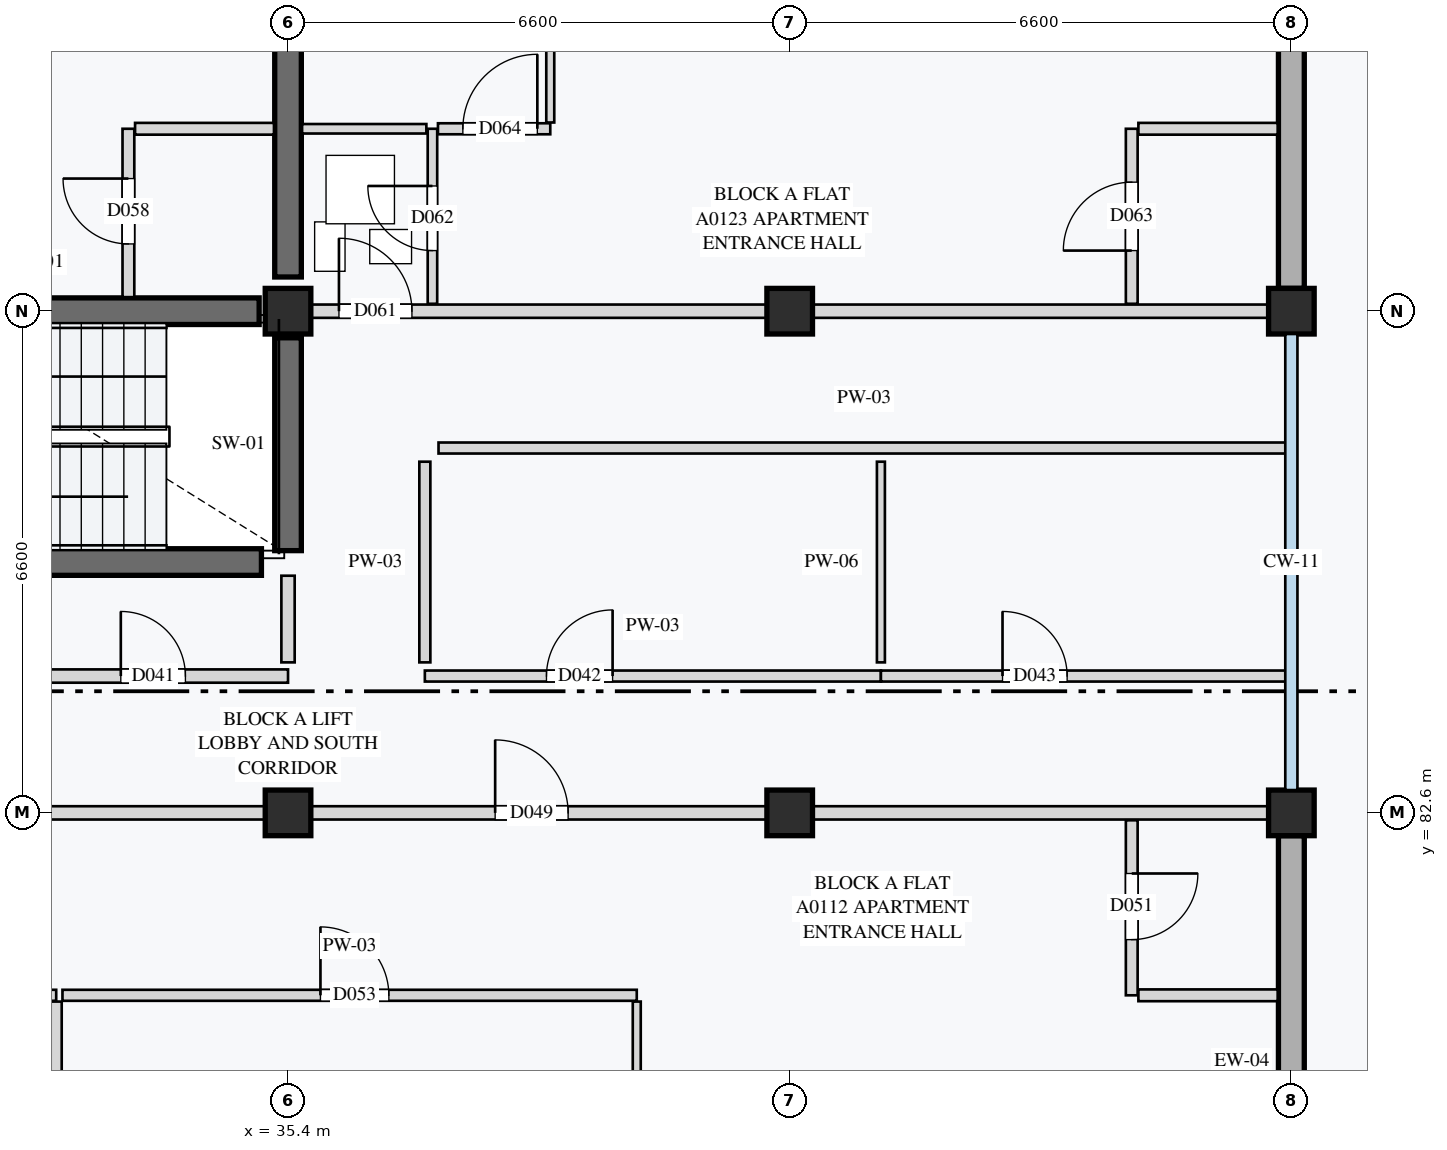
"""IFC4 building model, lengths in metres.
Left out: names, types, materials, properties, quantities, classifications, styles, units other than length and angle.
Written with IfcOpenShell. Run it as: python <this file> out.ifc"""

import sys

from ifc_helpers import new_model, si_unit, direction, frame, frame_2d, origin, origin_2d, place, context, subcontext, project, spatial, rectangle, extrude, element, fill, save


model = new_model("IFC4")
c1 = context("Model", 3, precision=1e-05, world=origin(), true_north=direction((0.0, 1.0)))
c2 = subcontext(c1, "Body", "Model", "MODEL_VIEW")
j1 = project(units=[si_unit("LENGTHUNIT", "METRE"), si_unit("PLANEANGLEUNIT", "RADIAN")], contexts=[c1])
p1 = place(None, origin())
s1 = spatial("IfcSite", under=j1, at=p1, CompositionType="ELEMENT")
p2 = place(p1, origin())
s2 = spatial("IfcBuilding", under=s1, at=p2, CompositionType="ELEMENT")
p3 = place(p2, frame((0.0, 0.0, 4.2)))
s3 = spatial("IfcBuildingStorey", under=s2, at=p3, CompositionType="ELEMENT", Elevation=4.2)
for number, where, z_axis, x_axis in (
    (1, (35.4, 82.6, 0.0), (0.0, 0.0, 1.0), (1.0, 0.0, 0.0)),
    (2, (35.4, 89.2, 0.0), (0.0, 0.0, 1.0), (1.0, 0.0, 0.0)),
    (3, (42.0, 82.6, 0.0), (0.0, 0.0, 1.0), (1.0, 0.0, 0.0)),
    (4, (42.0, 89.2, 0.0), (0.0, 0.0, 1.0), (1.0, 0.0, 0.0)),
    (5, (48.6, 82.6, 0.0), (0.0, 0.0, 1.0), (1.0, 0.0, 0.0)),
    (6, (48.6, 89.2, 0.0), (0.0, 0.0, 1.0), (1.0, 0.0, 0.0)),
):
    element("IfcColumn", number, at=place(p3, frame(where, z_axis=z_axis, x_axis=x_axis)), inside=s3, PredefinedType="COLUMN", context=c2, shape_type="SweptSolid", body=[
        extrude(rectangle(XDim=0.6, YDim=0.6, at=origin_2d()), origin(), (0.0, 0.0, 1.0), 4.2),
    ])
p4 = place(p3, frame((29.18, 89.2, 0.0), z_axis=(0.0, 0.0, 1.0), x_axis=(1.0, 0.0, 0.0)))
e7 = element("IfcWall", 7, at=p4, inside=s3, PredefinedType="SHEAR", context=c2, shape_type="SweptSolid", body=[
    extrude(rectangle(XDim=5.84, YDim=0.35, at=frame_2d((2.92, 0.0))), origin(), (0.0, 0.0, 1.0), 3.96),
])
for number, where, z_axis, x_axis in (
    (8, (32.25, 85.9, 0.0), (0.0, 0.0, 1.0), (1.0, 0.0, 0.0)),
    (9, (35.4, 86.05, 0.0), (0.0, 0.0, 1.0), (0.0, 1.0, 0.0)),
):
    element("IfcWall", number, at=place(p3, frame(where, z_axis=z_axis, x_axis=x_axis)), inside=s3, PredefinedType="SHEAR", context=c2, shape_type="SweptSolid", body=[
        extrude(rectangle(XDim=2.8, YDim=0.35, at=frame_2d((1.4, 0.0))), origin(), (0.0, 0.0, 1.0), 3.96),
    ])
p5 = place(p3, frame((35.4, 89.65, 0.0), z_axis=(0.0, 0.0, 1.0), x_axis=(0.0, 1.0, 0.0)))
e10 = element("IfcWall", 10, at=p5, inside=s3, PredefinedType="SHEAR", context=c2, shape_type="SweptSolid", body=[
    extrude(rectangle(XDim=5.7, YDim=0.35, at=frame_2d((2.85, 0.0))), origin(), (0.0, 0.0, 1.0), 3.96),
])
for number, where, z_axis, x_axis in (
    (11, (48.6, 76.375, 0.0), (0.0, 0.0, 1.0), (0.0, 1.0, 0.0)),
    (12, (48.6, 89.5, 0.0), (0.0, 0.0, 1.0), (0.0, 1.0, 0.0)),
):
    element("IfcWall", number, at=place(p3, frame(where, z_axis=z_axis, x_axis=x_axis)), inside=s3, PredefinedType="STANDARD", context=c2, shape_type="SweptSolid", body=[
        extrude(rectangle(XDim=5.925, YDim=0.34, at=frame_2d((2.962, 0.0))), origin(), (0.0, 0.0, 1.0), 3.65),
    ])
p6 = place(p3, frame((32.1, 84.4, 0.0), z_axis=(0.0, 0.0, 1.0), x_axis=(1.0, 0.0, 0.0)))
e13 = element("IfcWall", 13, at=p6, inside=s3, PredefinedType="PARTITIONING", context=c2, shape_type="SweptSolid", body=[
    extrude(rectangle(XDim=3.3, YDim=0.175, at=frame_2d((1.65, 0.0))), origin(), (0.0, 0.0, 1.0), 3.96),
])
p7 = place(p6, frame((1.1, 0.0, 0.0)))
e14 = element("IfcOpeningElement", 14, at=p7, cuts=e13, PredefinedType="OPENING", context=c2, shape_type="SweptSolid", body=[
    extrude(rectangle(XDim=0.85, YDim=2.0, at=frame_2d((0.425, 1.0))), frame((0.0, 0.097, 0.0), z_axis=(0.0, -1.0, 0.0), x_axis=(1.0, 0.0, 0.0)), (0.0, 0.0, 1.0), 0.195),
])
p8 = place(p3, frame((35.4, 84.58, 0.0), z_axis=(0.0, 0.0, 1.0), x_axis=(0.0, 1.0, 0.0)))
e15 = element("IfcWall", 15, at=p8, inside=s3, PredefinedType="PARTITIONING", context=c2, shape_type="SweptSolid", body=[
    extrude(rectangle(XDim=1.14, YDim=0.175, at=frame_2d((0.57, 0.0))), origin(), (0.0, 0.0, 1.0), 3.96),
])
p9 = place(p3, frame((37.2, 84.4, 0.0), z_axis=(0.0, 0.0, 1.0), x_axis=(1.0, 0.0, 0.0)))
e16 = element("IfcWall", 16, at=p9, inside=s3, PredefinedType="PARTITIONING", context=c2, shape_type="SweptSolid", body=[
    extrude(rectangle(XDim=6.0, YDim=0.145, at=frame_2d((3.0, 0.0))), origin(), (0.0, 0.0, 1.0), 3.96),
])
p10 = place(p9, frame((1.6, 0.0, 0.0)))
e17 = element("IfcOpeningElement", 17, at=p10, cuts=e16, PredefinedType="OPENING", context=c2, shape_type="SweptSolid", body=[
    extrude(rectangle(XDim=0.87, YDim=2.08, at=frame_2d((0.435, 1.04))), frame((0.0, 0.083, 0.0), z_axis=(0.0, -1.0, 0.0), x_axis=(1.0, 0.0, 0.0)), (0.0, 0.0, 1.0), 0.165),
])
p11 = place(p3, frame((43.2, 84.4, 0.0), z_axis=(0.0, 0.0, 1.0), x_axis=(1.0, 0.0, 0.0)))
e18 = element("IfcWall", 18, at=p11, inside=s3, PredefinedType="PARTITIONING", context=c2, shape_type="SweptSolid", body=[
    extrude(rectangle(XDim=5.4, YDim=0.145, at=frame_2d((2.7, 0.0))), origin(), (0.0, 0.0, 1.0), 3.96),
])
p12 = place(p11, frame((1.6, 0.0, 0.0)))
e19 = element("IfcOpeningElement", 19, at=p12, cuts=e18, PredefinedType="OPENING", context=c2, shape_type="SweptSolid", body=[
    extrude(rectangle(XDim=0.85, YDim=2.1, at=frame_2d((0.425, 1.05))), frame((0.0, 0.083, 0.0), z_axis=(0.0, -1.0, 0.0), x_axis=(1.0, 0.0, 0.0)), (0.0, 0.0, 1.0), 0.165),
])
p13 = place(p3, frame((43.2, 84.58, 0.0), z_axis=(0.0, 0.0, 1.0), x_axis=(0.0, 1.0, 0.0)))
e20 = element("IfcWall", 20, at=p13, inside=s3, PredefinedType="PARTITIONING", context=c2, shape_type="SweptSolid", body=[
    extrude(rectangle(XDim=2.64, YDim=0.105, at=frame_2d((1.32, 0.0))), origin(), (0.0, 0.0, 1.0), 3.96),
])
p14 = place(p3, frame((37.38, 87.4, 0.0), z_axis=(0.0, 0.0, 1.0), x_axis=(1.0, 0.0, 0.0)))
e21 = element("IfcWall", 21, at=p14, inside=s3, PredefinedType="PARTITIONING", context=c2, shape_type="SweptSolid", body=[
    extrude(rectangle(XDim=11.2, YDim=0.145, at=frame_2d((5.6, 0.0))), origin(), (0.0, 0.0, 1.0), 3.96),
])
p15 = place(p3, frame((37.2, 84.58, 0.0), z_axis=(0.0, 0.0, 1.0), x_axis=(0.0, 1.0, 0.0)))
e22 = element("IfcWall", 22, at=p15, inside=s3, PredefinedType="PARTITIONING", context=c2, shape_type="SweptSolid", body=[
    extrude(rectangle(XDim=2.64, YDim=0.145, at=frame_2d((1.32, 0.0))), origin(), (0.0, 0.0, 1.0), 3.96),
])
p16 = place(p3, frame((28.8, 82.6, 0.0), z_axis=(0.0, 0.0, 1.0), x_axis=(1.0, 0.0, 0.0)))
e23 = element("IfcWall", 23, at=p16, inside=s3, PredefinedType="PARTITIONING", context=c2, shape_type="SweptSolid", body=[
    extrude(rectangle(XDim=19.8, YDim=0.175, at=frame_2d((9.9, 0.0))), origin(), (0.0, 0.0, 1.0), 3.7),
])
p17 = place(p16, frame((9.325, 0.0, 0.0)))
e24 = element("IfcOpeningElement", 24, at=p17, cuts=e23, PredefinedType="OPENING", context=c2, shape_type="SweptSolid", body=[
    extrude(rectangle(XDim=0.96, YDim=2.18, at=frame_2d((0.48, 1.09))), frame((0.0, 0.097, 0.0), z_axis=(0.0, -1.0, 0.0), x_axis=(1.0, 0.0, 0.0)), (0.0, 0.0, 1.0), 0.195),
])
p18 = place(p3, frame((46.5, 82.502, 0.0), z_axis=(0.0, 0.0, 1.0), x_axis=(0.0, -1.0, 0.0)))
e25 = element("IfcWall", 25, at=p18, inside=s3, PredefinedType="PARTITIONING", context=c2, shape_type="SweptSolid", body=[
    extrude(rectangle(XDim=2.302, YDim=0.155, at=frame_2d((1.151, 0.0))), origin(), (0.0, 0.0, 1.0), 3.96),
])
p19 = place(p18, frame((0.7, 0.0, 0.0)))
e26 = element("IfcOpeningElement", 26, at=p19, cuts=e25, PredefinedType="OPENING", context=c2, shape_type="SweptSolid", body=[
    extrude(rectangle(XDim=0.87, YDim=2.08, at=frame_2d((0.435, 1.04))), frame((0.0, 0.087, 0.0), z_axis=(0.0, -1.0, 0.0), x_axis=(1.0, 0.0, 0.0)), (0.0, 0.0, 1.0), 0.175),
])
p20 = place(p3, frame((46.587, 80.2, 0.0), z_axis=(0.0, 0.0, 1.0), x_axis=(1.0, 0.0, 0.0)))
e27 = element("IfcWall", 27, at=p20, inside=s3, PredefinedType="PARTITIONING", context=c2, shape_type="SweptSolid", body=[
    extrude(rectangle(XDim=1.833, YDim=0.155, at=frame_2d((0.916, 0.0))), origin(), (0.0, 0.0, 1.0), 3.96),
])
p21 = place(p3, frame((30.772, 80.2, 0.0), z_axis=(0.0, 0.0, 1.0), x_axis=(1.0, 0.0, 0.0)))
e28 = element("IfcWall", 28, at=p21, inside=s3, PredefinedType="PARTITIONING", context=c2, shape_type="SweptSolid", body=[
    extrude(rectangle(XDim=1.578, YDim=0.145, at=frame_2d((0.789, 0.0))), origin(), (0.0, 0.0, 1.0), 3.96),
])
p22 = place(p21, frame((0.4, 0.0, 0.0)))
e29 = element("IfcOpeningElement", 29, at=p22, cuts=e28, PredefinedType="OPENING", context=c2, shape_type="SweptSolid", body=[
    extrude(rectangle(XDim=0.85, YDim=2.1, at=frame_2d((0.425, 1.05))), frame((0.0, 0.083, 0.0), z_axis=(0.0, -1.0, 0.0), x_axis=(1.0, 0.0, 0.0)), (0.0, 0.0, 1.0), 0.165),
])
p23 = place(p3, frame((32.35, 80.117, 0.0), z_axis=(0.0, 0.0, 1.0), x_axis=(0.0, -1.0, 0.0)))
e30 = element("IfcWall", 30, at=p23, inside=s3, PredefinedType="PARTITIONING", context=c2, shape_type="SweptSolid", body=[
    extrude(rectangle(XDim=3.938, YDim=0.145, at=frame_2d((1.969, 0.0))), origin(), (0.0, 0.0, 1.0), 3.96),
])
p24 = place(p3, frame((32.433, 80.2, 0.0), z_axis=(0.0, 0.0, 1.0), x_axis=(1.0, 0.0, 0.0)))
e31 = element("IfcWall", 31, at=p24, inside=s3, PredefinedType="PARTITIONING", context=c2, shape_type="SweptSolid", body=[
    extrude(rectangle(XDim=7.555, YDim=0.145, at=frame_2d((3.778, 0.0))), origin(), (0.0, 0.0, 1.0), 3.96),
])
p25 = place(p24, frame((3.394, 0.0, 0.0)))
e32 = element("IfcOpeningElement", 32, at=p25, cuts=e31, PredefinedType="OPENING", context=c2, shape_type="SweptSolid", body=[
    extrude(rectangle(XDim=0.9, YDim=2.1, at=frame_2d((0.45, 1.05))), frame((0.0, 0.083, 0.0), z_axis=(0.0, -1.0, 0.0), x_axis=(1.0, 0.0, 0.0)), (0.0, 0.0, 1.0), 0.165),
])
p26 = place(p3, frame((39.988, 80.117, 0.0), z_axis=(0.0, 0.0, 1.0), x_axis=(0.0, -1.0, 0.0)))
e33 = element("IfcWall", 33, at=p26, inside=s3, PredefinedType="PARTITIONING", context=c2, shape_type="SweptSolid", body=[
    extrude(rectangle(XDim=3.938, YDim=0.105, at=frame_2d((1.969, 0.0))), origin(), (0.0, 0.0, 1.0), 3.96),
])
p27 = place(p3, frame((33.3, 89.385, 0.0), z_axis=(0.0, 0.0, 1.0), x_axis=(0.0, 1.0, 0.0)))
e34 = element("IfcWall", 34, at=p27, inside=s3, PredefinedType="PARTITIONING", context=c2, shape_type="SweptSolid", body=[
    extrude(rectangle(XDim=2.215, YDim=0.155, at=frame_2d((1.107, 0.0))), origin(), (0.0, 0.0, 1.0), 3.96),
])
p28 = place(p27, frame((0.7, 0.0, 0.0)))
e35 = element("IfcOpeningElement", 35, at=p28, cuts=e34, PredefinedType="OPENING", context=c2, shape_type="SweptSolid", body=[
    extrude(rectangle(XDim=0.86, YDim=2.12, at=frame_2d((0.43, 1.06))), frame((0.0, 0.087, 0.0), z_axis=(0.0, -1.0, 0.0), x_axis=(1.0, 0.0, 0.0)), (0.0, 0.0, 1.0), 0.175),
])
p29 = place(p3, frame((33.387, 91.6, 0.0), z_axis=(0.0, 0.0, 1.0), x_axis=(1.0, 0.0, 0.0)))
e36 = element("IfcWall", 36, at=p29, inside=s3, PredefinedType="PARTITIONING", context=c2, shape_type="SweptSolid", body=[
    extrude(rectangle(XDim=1.828, YDim=0.155, at=frame_2d((0.914, 0.0))), origin(), (0.0, 0.0, 1.0), 3.96),
])
p30 = place(p3, frame((35.4, 89.2, 0.0), z_axis=(0.0, 0.0, 1.0), x_axis=(1.0, 0.0, 0.0)))
e37 = element("IfcWall", 37, at=p30, inside=s3, PredefinedType="PARTITIONING", context=c2, shape_type="SweptSolid", body=[
    extrude(rectangle(XDim=13.2, YDim=0.175, at=frame_2d((6.6, 0.0))), origin(), (0.0, 0.0, 1.0), 3.7),
])
p31 = place(p30, frame((0.67, 0.0, 0.0)))
e38 = element("IfcOpeningElement", 38, at=p31, cuts=e37, PredefinedType="OPENING", context=c2, shape_type="SweptSolid", body=[
    extrude(rectangle(XDim=0.96, YDim=2.18, at=frame_2d((0.48, 1.09))), frame((0.0, 0.097, 0.0), z_axis=(0.0, -1.0, 0.0), x_axis=(1.0, 0.0, 0.0)), (0.0, 0.0, 1.0), 0.195),
])
p32 = place(p3, frame((37.3, 89.298, 0.0), z_axis=(0.0, 0.0, 1.0), x_axis=(0.0, 1.0, 0.0)))
e39 = element("IfcWall", 39, at=p32, inside=s3, PredefinedType="PARTITIONING", context=c2, shape_type="SweptSolid", body=[
    extrude(rectangle(XDim=2.302, YDim=0.125, at=frame_2d((1.151, 0.0))), origin(), (0.0, 0.0, 1.0), 3.96),
])
p33 = place(p32, frame((0.7, 0.0, 0.0)))
e40 = element("IfcOpeningElement", 40, at=p33, cuts=e39, PredefinedType="OPENING", context=c2, shape_type="SweptSolid", body=[
    extrude(rectangle(XDim=0.85, YDim=2.04, at=frame_2d((0.425, 1.02))), frame((0.0, 0.073, 0.0), z_axis=(0.0, -1.0, 0.0), x_axis=(1.0, 0.0, 0.0)), (0.0, 0.0, 1.0), 0.145),
])
p34 = place(p3, frame((35.585, 91.6, 0.0), z_axis=(0.0, 0.0, 1.0), x_axis=(1.0, 0.0, 0.0)))
e41 = element("IfcWall", 41, at=p34, inside=s3, PredefinedType="PARTITIONING", context=c2, shape_type="SweptSolid", body=[
    extrude(rectangle(XDim=1.635, YDim=0.125, at=frame_2d((0.817, 0.0))), origin(), (0.0, 0.0, 1.0), 3.96),
])
p35 = place(p3, frame((46.5, 89.298, 0.0), z_axis=(0.0, 0.0, 1.0), x_axis=(0.0, 1.0, 0.0)))
e42 = element("IfcWall", 42, at=p35, inside=s3, PredefinedType="PARTITIONING", context=c2, shape_type="SweptSolid", body=[
    extrude(rectangle(XDim=2.302, YDim=0.155, at=frame_2d((1.151, 0.0))), origin(), (0.0, 0.0, 1.0), 3.96),
])
p36 = place(p35, frame((0.7, 0.0, 0.0)))
e43 = element("IfcOpeningElement", 43, at=p36, cuts=e42, PredefinedType="OPENING", context=c2, shape_type="SweptSolid", body=[
    extrude(rectangle(XDim=0.9, YDim=2.16, at=frame_2d((0.45, 1.08))), frame((0.0, 0.087, 0.0), z_axis=(0.0, -1.0, 0.0), x_axis=(1.0, 0.0, 0.0)), (0.0, 0.0, 1.0), 0.175),
])
p37 = place(p3, frame((46.587, 91.6, 0.0), z_axis=(0.0, 0.0, 1.0), x_axis=(1.0, 0.0, 0.0)))
e44 = element("IfcWall", 44, at=p37, inside=s3, PredefinedType="PARTITIONING", context=c2, shape_type="SweptSolid", body=[
    extrude(rectangle(XDim=1.833, YDim=0.155, at=frame_2d((0.916, 0.0))), origin(), (0.0, 0.0, 1.0), 3.96),
])
p38 = place(p3, frame((37.373, 91.6, 0.0), z_axis=(0.0, 0.0, 1.0), x_axis=(1.0, 0.0, 0.0)))
e45 = element("IfcWall", 45, at=p38, inside=s3, PredefinedType="PARTITIONING", context=c2, shape_type="SweptSolid", body=[
    extrude(rectangle(XDim=1.478, YDim=0.145, at=frame_2d((0.739, 0.0))), origin(), (0.0, 0.0, 1.0), 3.96),
])
p39 = place(p38, frame((0.327, 0.0, 0.0)))
e46 = element("IfcOpeningElement", 46, at=p39, cuts=e45, PredefinedType="OPENING", context=c2, shape_type="SweptSolid", body=[
    extrude(rectangle(XDim=0.98, YDim=2.12, at=frame_2d((0.49, 1.06))), frame((0.0, 0.083, 0.0), z_axis=(0.0, -1.0, 0.0), x_axis=(1.0, 0.0, 0.0)), (0.0, 0.0, 1.0), 0.165),
])
p40 = place(p3, frame((38.85, 91.683, 0.0), z_axis=(0.0, 0.0, 1.0), x_axis=(0.0, 1.0, 0.0)))
e47 = element("IfcWall", 47, at=p40, inside=s3, PredefinedType="PARTITIONING", context=c2, shape_type="SweptSolid", body=[
    extrude(rectangle(XDim=3.938, YDim=0.105, at=frame_2d((1.969, 0.0))), origin(), (0.0, 0.0, 1.0), 3.96),
])
p41 = place(p7, origin())
e48 = element("IfcDoor", 48, at=p41, inside=s3, OperationType="SINGLE_SWING_LEFT", PredefinedType="DOOR", context=c2, shape_type="SweptSolid", body=[
    extrude(rectangle(XDim=0.85, YDim=2.0, at=frame_2d((0.425, 1.0))), frame((0.0, 0.025, 0.0), z_axis=(0.0, -1.0, 0.0), x_axis=(1.0, 0.0, 0.0)), (0.0, 0.0, 1.0), 0.05),
])
fill(e14, e48)
p42 = place(p10, origin())
e49 = element("IfcDoor", 49, at=p42, inside=s3, OperationType="SINGLE_SWING_RIGHT", PredefinedType="DOOR", context=c2, shape_type="SweptSolid", body=[
    extrude(rectangle(XDim=0.87, YDim=2.08, at=frame_2d((0.435, 1.04))), frame((0.0, 0.025, 0.0), z_axis=(0.0, -1.0, 0.0), x_axis=(1.0, 0.0, 0.0)), (0.0, 0.0, 1.0), 0.05),
])
fill(e17, e49)
p43 = place(p12, origin())
e50 = element("IfcDoor", 50, at=p43, inside=s3, OperationType="SINGLE_SWING_LEFT", PredefinedType="DOOR", context=c2, shape_type="SweptSolid", body=[
    extrude(rectangle(XDim=0.85, YDim=2.1, at=frame_2d((0.425, 1.05))), frame((0.0, 0.025, 0.0), z_axis=(0.0, -1.0, 0.0), x_axis=(1.0, 0.0, 0.0)), (0.0, 0.0, 1.0), 0.05),
])
fill(e19, e50)
p44 = place(p17, origin())
e51 = element("IfcDoor", 51, at=p44, inside=s3, OperationType="SINGLE_SWING_LEFT", PredefinedType="DOOR", context=c2, shape_type="SweptSolid", body=[
    extrude(rectangle(XDim=0.96, YDim=2.18, at=frame_2d((0.48, 1.09))), frame((0.0, 0.025, 0.0), z_axis=(0.0, -1.0, 0.0), x_axis=(1.0, 0.0, 0.0)), (0.0, 0.0, 1.0), 0.05),
])
fill(e24, e51)
p45 = place(p19, origin())
e52 = element("IfcDoor", 52, at=p45, inside=s3, OperationType="SINGLE_SWING_LEFT", PredefinedType="DOOR", context=c2, shape_type="SweptSolid", body=[
    extrude(rectangle(XDim=0.87, YDim=2.08, at=frame_2d((0.435, 1.04))), frame((0.0, 0.025, 0.0), z_axis=(0.0, -1.0, 0.0), x_axis=(1.0, 0.0, 0.0)), (0.0, 0.0, 1.0), 0.05),
])
fill(e26, e52)
p46 = place(p25, origin())
e53 = element("IfcDoor", 53, at=p46, inside=s3, OperationType="SINGLE_SWING_LEFT", PredefinedType="DOOR", context=c2, shape_type="SweptSolid", body=[
    extrude(rectangle(XDim=0.9, YDim=2.1, at=frame_2d((0.45, 1.05))), frame((0.0, 0.025, 0.0), z_axis=(0.0, -1.0, 0.0), x_axis=(1.0, 0.0, 0.0)), (0.0, 0.0, 1.0), 0.05),
])
fill(e32, e53)
p47 = place(p28, origin())
e54 = element("IfcDoor", 54, at=p47, inside=s3, OperationType="SINGLE_SWING_RIGHT", PredefinedType="DOOR", context=c2, shape_type="SweptSolid", body=[
    extrude(rectangle(XDim=0.86, YDim=2.12, at=frame_2d((0.43, 1.06))), frame((0.0, 0.025, 0.0), z_axis=(0.0, -1.0, 0.0), x_axis=(1.0, 0.0, 0.0)), (0.0, 0.0, 1.0), 0.05),
])
fill(e35, e54)
p48 = place(p31, origin())
e55 = element("IfcDoor", 55, at=p48, inside=s3, OperationType="SINGLE_SWING_LEFT", PredefinedType="DOOR", context=c2, shape_type="SweptSolid", body=[
    extrude(rectangle(XDim=0.96, YDim=2.18, at=frame_2d((0.48, 1.09))), frame((0.0, 0.025, 0.0), z_axis=(0.0, -1.0, 0.0), x_axis=(1.0, 0.0, 0.0)), (0.0, 0.0, 1.0), 0.05),
])
fill(e38, e55)
p49 = place(p33, origin())
e56 = element("IfcDoor", 56, at=p49, inside=s3, OperationType="SINGLE_SWING_RIGHT", PredefinedType="DOOR", context=c2, shape_type="SweptSolid", body=[
    extrude(rectangle(XDim=0.85, YDim=2.04, at=frame_2d((0.425, 1.02))), frame((0.0, 0.025, 0.0), z_axis=(0.0, -1.0, 0.0), x_axis=(1.0, 0.0, 0.0)), (0.0, 0.0, 1.0), 0.05),
])
fill(e40, e56)
p50 = place(p36, origin())
e57 = element("IfcDoor", 57, at=p50, inside=s3, OperationType="SINGLE_SWING_LEFT", PredefinedType="DOOR", context=c2, shape_type="SweptSolid", body=[
    extrude(rectangle(XDim=0.9, YDim=2.16, at=frame_2d((0.45, 1.08))), frame((0.0, 0.025, 0.0), z_axis=(0.0, -1.0, 0.0), x_axis=(1.0, 0.0, 0.0)), (0.0, 0.0, 1.0), 0.05),
])
fill(e43, e57)
p51 = place(p39, origin())
e58 = element("IfcDoor", 58, at=p51, inside=s3, OperationType="SINGLE_SWING_RIGHT", PredefinedType="DOOR", context=c2, shape_type="SweptSolid", body=[
    extrude(rectangle(XDim=0.98, YDim=2.12, at=frame_2d((0.49, 1.06))), frame((0.0, 0.025, 0.0), z_axis=(0.0, -1.0, 0.0), x_axis=(1.0, 0.0, 0.0)), (0.0, 0.0, 1.0), 0.05),
])
fill(e46, e58)
save(model, sys.argv[1])
